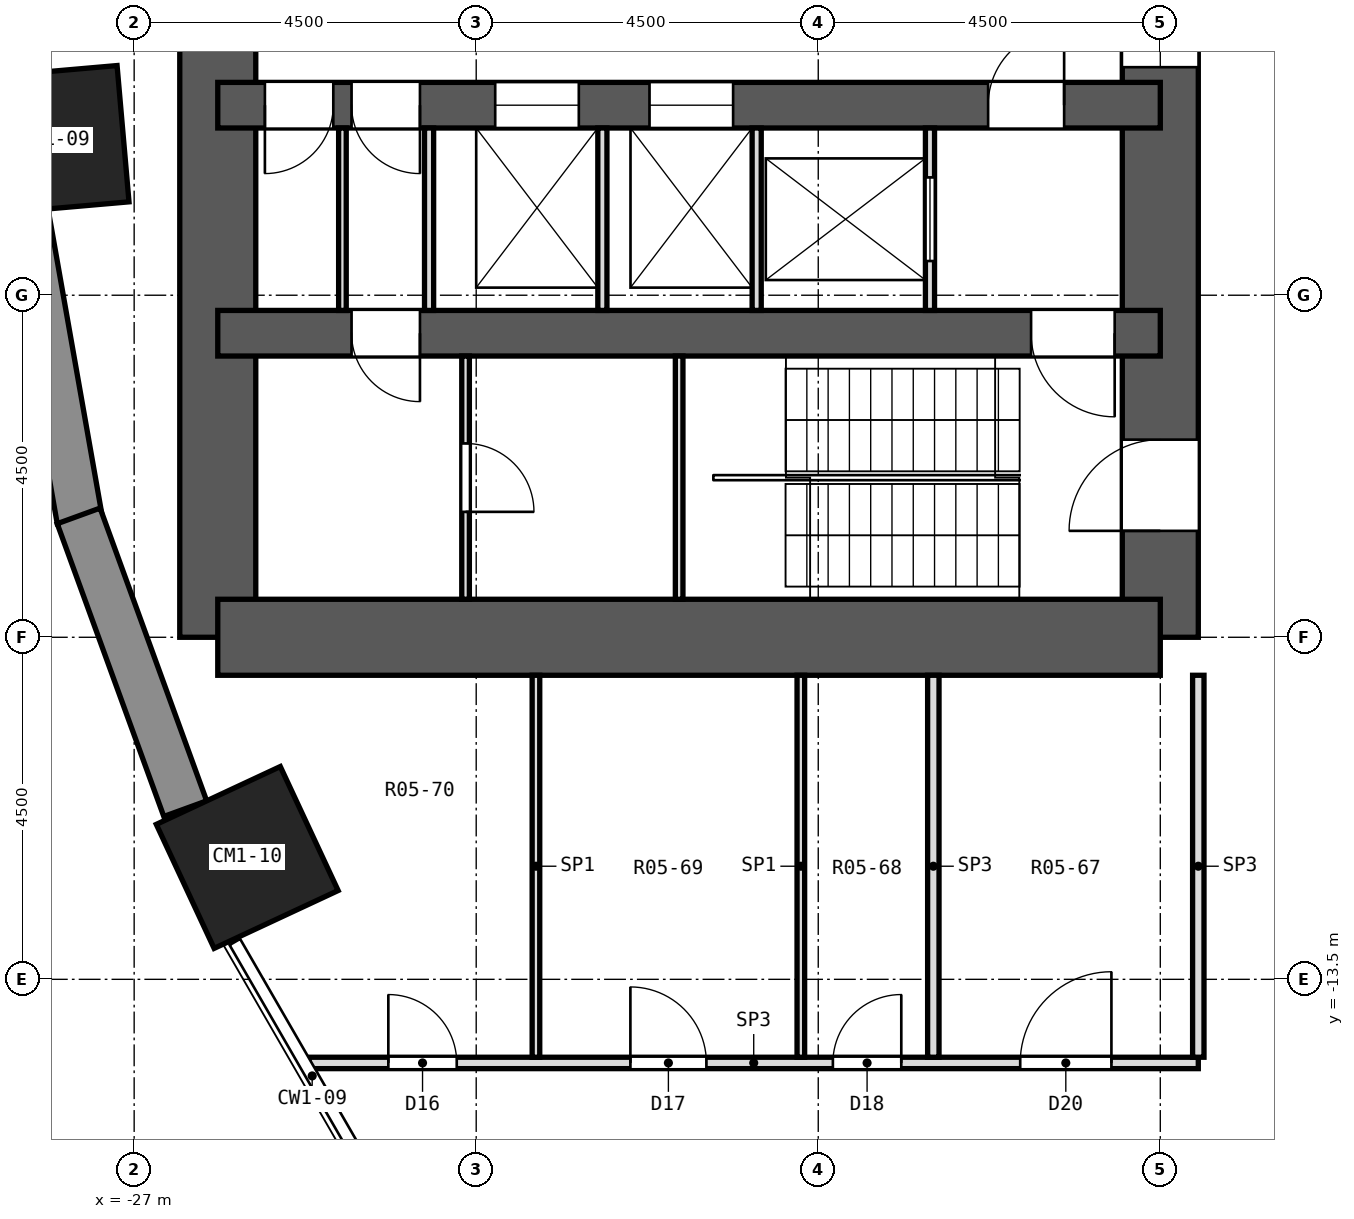
"""IFC4 building model, lengths in metres.
Left out: names, types, materials, properties, quantities, classifications, styles, units other than length and angle.
Written with IfcOpenShell. Run it as: python <this file> out.ifc"""

import sys

from ifc_helpers import new_model, si_unit, direction, frame, frame_2d, origin, origin_2d, place, context, subcontext, project, spatial, rectangle, extrude, element, fill, save


model = new_model("IFC4")
c1 = context("Model", 3, precision=1e-05, world=origin(), true_north=direction((0.0, 1.0)))
c2 = subcontext(c1, "Body", "Model", "MODEL_VIEW")
j1 = project(units=[si_unit("LENGTHUNIT", "METRE"), si_unit("PLANEANGLEUNIT", "RADIAN")], contexts=[c1])
p1 = place(None, origin())
s1 = spatial("IfcSite", under=j1, at=p1, CompositionType="ELEMENT")
p2 = place(p1, origin())
s2 = spatial("IfcBuilding", under=s1, at=p2, CompositionType="ELEMENT")
p3 = place(p2, frame((0.0, 0.0, 9.2)))
s3 = spatial("IfcBuildingStorey", under=s2, at=p3, CompositionType="ELEMENT", Elevation=9.2)
for number, where, z_axis, x_axis in (
    (1, (-28.043, -2.453, 0.0), (0.0, 0.0, 1.0), (-0.996, -0.087, 0.0)),
    (2, (-25.512, -11.897, 0.0), (0.0, 0.0, 1.0), (-0.906, -0.423, 0.0)),
):
    element("IfcColumn", number, at=place(p3, frame(where, z_axis=z_axis, x_axis=x_axis)), inside=s3, PredefinedType="COLUMN", context=c2, shape_type="SweptSolid", body=[
        extrude(rectangle(XDim=1.8, YDim=1.8, at=origin_2d()), origin(), (0.0, 0.0, 1.0), 4.2),
    ])
p4 = place(p3, frame((-13.5, -9.0, 0.0), z_axis=(0.0, 0.0, 1.0), x_axis=(0.0, 1.0, 0.0)))
e3 = element("IfcWall", 3, at=p4, inside=s3, PredefinedType="SHEAR", context=c2, shape_type="SweptSolid", body=[
    extrude(rectangle(XDim=18.0, YDim=1.0, at=frame_2d((9.0, 0.0))), origin(), (0.0, 0.0, 1.0), 4.2),
])
p5 = place(p4, frame((15.4, 0.0, 0.0)))
e4 = element("IfcOpeningElement", 4, at=p5, cuts=e3, PredefinedType="OPENING", context=c2, shape_type="SweptSolid", body=[
    extrude(rectangle(XDim=1.2, YDim=2.1, at=frame_2d((0.6, 1.05))), frame((0.0, 0.512, 0.0), z_axis=(0.0, -1.0, 0.0), x_axis=(1.0, 0.0, 0.0)), (0.0, 0.0, 1.0), 1.024),
])
p6 = place(p4, frame((1.4, 0.0, 0.0)))
e5 = element("IfcOpeningElement", 5, at=p6, cuts=e3, PredefinedType="OPENING", context=c2, shape_type="SweptSolid", body=[
    extrude(rectangle(XDim=1.2, YDim=2.1, at=frame_2d((0.6, 1.05))), frame((0.0, 0.512, 0.0), z_axis=(0.0, -1.0, 0.0), x_axis=(1.0, 0.0, 0.0)), (0.0, 0.0, 1.0), 1.024),
])
p7 = place(p4, frame((7.5, 0.0, 0.0)))
e6 = element("IfcOpeningElement", 6, at=p7, cuts=e3, PredefinedType="OPENING", context=c2, shape_type="SweptSolid", body=[
    extrude(rectangle(XDim=3.0, YDim=2.4, at=frame_2d((1.5, 1.2))), frame((0.0, 0.512, 0.0), z_axis=(0.0, -1.0, 0.0), x_axis=(1.0, 0.0, 0.0)), (0.0, 0.0, 1.0), 1.024),
])
p8 = place(p3, frame((-25.9, -9.0, 0.0), z_axis=(0.0, 0.0, 1.0), x_axis=(0.0, 1.0, 0.0)))
e7 = element("IfcWall", 7, at=p8, inside=s3, PredefinedType="SHEAR", context=c2, shape_type="SweptSolid", body=[
    extrude(rectangle(XDim=18.0, YDim=1.0, at=frame_2d((9.0, 0.0))), origin(), (0.0, 0.0, 1.0), 4.2),
])
p9 = place(p3, frame((-13.5, -9.0, 0.0), z_axis=(0.0, 0.0, 1.0), x_axis=(-1.0, 0.0, 0.0)))
e8 = element("IfcWall", 8, at=p9, inside=s3, PredefinedType="SHEAR", context=c2, shape_type="SweptSolid", body=[
    extrude(rectangle(XDim=12.4, YDim=1.0, at=frame_2d((6.2, 0.0))), origin(), (0.0, 0.0, 1.0), 4.2),
])
p10 = place(p3, frame((-13.5, -5.0, 0.0), z_axis=(0.0, 0.0, 1.0), x_axis=(-1.0, 0.0, 0.0)))
e9 = element("IfcWall", 9, at=p10, inside=s3, PredefinedType="SHEAR", context=c2, shape_type="SweptSolid", body=[
    extrude(rectangle(XDim=12.4, YDim=0.6, at=frame_2d((6.2, 0.0))), origin(), (0.0, 0.0, 1.0), 4.2),
])
p11 = place(p10, frame((9.74, 0.0, 0.0)))
e10 = element("IfcOpeningElement", 10, at=p11, cuts=e9, PredefinedType="OPENING", context=c2, shape_type="SweptSolid", body=[
    extrude(rectangle(XDim=0.9, YDim=2.1, at=frame_2d((0.45, 1.05))), frame((0.0, 0.312, 0.0), z_axis=(0.0, -1.0, 0.0), x_axis=(1.0, 0.0, 0.0)), (0.0, 0.0, 1.0), 0.624),
])
p12 = place(p10, frame((0.6, 0.0, 0.0)))
e11 = element("IfcOpeningElement", 11, at=p12, cuts=e9, PredefinedType="OPENING", context=c2, shape_type="SweptSolid", body=[
    extrude(rectangle(XDim=1.1, YDim=2.1, at=frame_2d((0.55, 1.05))), frame((0.0, 0.312, 0.0), z_axis=(0.0, -1.0, 0.0), x_axis=(1.0, 0.0, 0.0)), (0.0, 0.0, 1.0), 0.624),
])
p13 = place(p3, frame((-13.5, -2.0, 0.0), z_axis=(0.0, 0.0, 1.0), x_axis=(-1.0, 0.0, 0.0)))
e12 = element("IfcWall", 12, at=p13, inside=s3, PredefinedType="SHEAR", context=c2, shape_type="SweptSolid", body=[
    extrude(rectangle(XDim=12.4, YDim=0.6, at=frame_2d((6.2, 0.0))), origin(), (0.0, 0.0, 1.0), 4.2),
])
p14 = place(p13, frame((5.62, 0.0, 0.0)))
e13 = element("IfcOpeningElement", 13, at=p14, cuts=e12, PredefinedType="OPENING", context=c2, shape_type="SweptSolid", body=[
    extrude(rectangle(XDim=1.1, YDim=2.1, at=frame_2d((0.55, 1.05))), frame((0.0, 0.312, 0.0), z_axis=(0.0, -1.0, 0.0), x_axis=(1.0, 0.0, 0.0)), (0.0, 0.0, 1.0), 0.624),
])
p15 = place(p13, frame((7.65, 0.0, 0.0)))
e14 = element("IfcOpeningElement", 14, at=p15, cuts=e12, PredefinedType="OPENING", context=c2, shape_type="SweptSolid", body=[
    extrude(rectangle(XDim=1.1, YDim=2.1, at=frame_2d((0.55, 1.05))), frame((0.0, 0.312, 0.0), z_axis=(0.0, -1.0, 0.0), x_axis=(1.0, 0.0, 0.0)), (0.0, 0.0, 1.0), 0.624),
])
p16 = place(p13, frame((1.265, 0.0, 0.0)))
e15 = element("IfcOpeningElement", 15, at=p16, cuts=e12, PredefinedType="OPENING", context=c2, shape_type="SweptSolid", body=[
    extrude(rectangle(XDim=1.0, YDim=2.1, at=frame_2d((0.5, 1.05))), frame((0.0, 0.312, 0.0), z_axis=(0.0, -1.0, 0.0), x_axis=(1.0, 0.0, 0.0)), (0.0, 0.0, 1.0), 0.624),
])
p17 = place(p13, frame((9.74, 0.0, 0.0)))
e16 = element("IfcOpeningElement", 16, at=p17, cuts=e12, PredefinedType="OPENING", context=c2, shape_type="SweptSolid", body=[
    extrude(rectangle(XDim=0.9, YDim=2.1, at=frame_2d((0.45, 1.05))), frame((0.0, 0.312, 0.0), z_axis=(0.0, -1.0, 0.0), x_axis=(1.0, 0.0, 0.0)), (0.0, 0.0, 1.0), 0.624),
])
p18 = place(p13, frame((10.88, 0.0, 0.0)))
e17 = element("IfcOpeningElement", 17, at=p18, cuts=e12, PredefinedType="OPENING", context=c2, shape_type="SweptSolid", body=[
    extrude(rectangle(XDim=0.9, YDim=2.1, at=frame_2d((0.45, 1.05))), frame((0.0, 0.312, 0.0), z_axis=(0.0, -1.0, 0.0), x_axis=(1.0, 0.0, 0.0)), (0.0, 0.0, 1.0), 0.624),
])
p19 = place(p3, frame((-28.428, -3.417, 0.0), z_axis=(0.0, 0.0, 1.0), x_axis=(0.173673210505, -0.984803338719, 0.0)))
e18 = element("IfcWall", 18, at=p19, inside=s3, PredefinedType="SOLIDWALL", context=c2, shape_type="SweptSolid", body=[
    extrude(rectangle(XDim=4.099, YDim=0.6, at=frame_2d((2.05, 0.0))), origin(), (0.0, 0.0, 1.0), 3.65),
])
p20 = place(p3, frame((-27.73, -7.403, 0.0), z_axis=(0.0, 0.0, 1.0), x_axis=(0.342034744565, -0.939687306241, 0.0)))
e19 = element("IfcWall", 19, at=p20, inside=s3, PredefinedType="SOLIDWALL", context=c2, shape_type="SweptSolid", body=[
    extrude(rectangle(XDim=4.099, YDim=0.6, at=frame_2d((2.05, 0.0))), origin(), (0.0, 0.0, 1.0), 3.65),
])
p21 = place(p3, frame((-24.698, -14.6, 0.0), z_axis=(0.0, 0.0, 1.0), x_axis=(1.0, 0.0, 0.0)))
e20 = element("IfcWall", 20, at=p21, inside=s3, PredefinedType="PARTITIONING", context=c2, shape_type="SweptSolid", body=[
    extrude(rectangle(XDim=11.698, YDim=0.15, at=frame_2d((5.849, 0.0))), origin(), (0.0, 0.0, 1.0), 3.65),
])
p22 = place(p21, frame((1.042, 0.0, 0.0)))
e21 = element("IfcOpeningElement", 21, at=p22, cuts=e20, PredefinedType="OPENING", context=c2, shape_type="SweptSolid", body=[
    extrude(rectangle(XDim=0.9, YDim=2.1, at=frame_2d((0.45, 1.05))), frame((0.0, 0.087, 0.0), z_axis=(0.0, -1.0, 0.0), x_axis=(1.0, 0.0, 0.0)), (0.0, 0.0, 1.0), 0.174),
])
p23 = place(p21, frame((4.227, 0.0, 0.0)))
e22 = element("IfcOpeningElement", 22, at=p23, cuts=e20, PredefinedType="OPENING", context=c2, shape_type="SweptSolid", body=[
    extrude(rectangle(XDim=1.0, YDim=2.1, at=frame_2d((0.5, 1.05))), frame((0.0, 0.087, 0.0), z_axis=(0.0, -1.0, 0.0), x_axis=(1.0, 0.0, 0.0)), (0.0, 0.0, 1.0), 0.174),
])
p24 = place(p21, frame((6.89, 0.0, 0.0)))
e23 = element("IfcOpeningElement", 23, at=p24, cuts=e20, PredefinedType="OPENING", context=c2, shape_type="SweptSolid", body=[
    extrude(rectangle(XDim=0.9, YDim=2.1, at=frame_2d((0.45, 1.05))), frame((0.0, 0.087, 0.0), z_axis=(0.0, -1.0, 0.0), x_axis=(1.0, 0.0, 0.0)), (0.0, 0.0, 1.0), 0.174),
])
p25 = place(p21, frame((9.355, 0.0, 0.0)))
e24 = element("IfcOpeningElement", 24, at=p25, cuts=e20, PredefinedType="OPENING", context=c2, shape_type="SweptSolid", body=[
    extrude(rectangle(XDim=1.2, YDim=2.1, at=frame_2d((0.6, 1.05))), frame((0.0, 0.087, 0.0), z_axis=(0.0, -1.0, 0.0), x_axis=(1.0, 0.0, 0.0)), (0.0, 0.0, 1.0), 0.174),
])
for number, where, z_axis, x_axis in (
    (25, (-13.0, -14.525, 0.0), (0.0, 0.0, 1.0), (0.0, 1.0, 0.0)),
    (26, (-16.486, -14.525, 0.0), (0.0, 0.0, 1.0), (0.0, 1.0, 0.0)),
):
    element("IfcWall", number, at=place(p3, frame(where, z_axis=z_axis, x_axis=x_axis)), inside=s3, PredefinedType="PARTITIONING", context=c2, shape_type="SweptSolid", body=[
        extrude(rectangle(XDim=5.025, YDim=0.15, at=frame_2d((2.512, 0.0))), origin(), (0.0, 0.0, 1.0), 3.65),
    ])
for number, where, z_axis, x_axis in (
    (27, (-18.229, -14.525, 0.0), (0.0, 0.0, 1.0), (0.0, 1.0, 0.0)),
    (28, (-21.714, -14.525, 0.0), (0.0, 0.0, 1.0), (0.0, 1.0, 0.0)),
):
    element("IfcWall", number, at=place(p3, frame(where, z_axis=z_axis, x_axis=x_axis)), inside=s3, PredefinedType="PARTITIONING", context=c2, shape_type="SweptSolid", body=[
        extrude(rectangle(XDim=5.025, YDim=0.1, at=frame_2d((2.512, 0.0))), origin(), (0.0, 0.0, 1.0), 3.65),
    ])
p26 = place(p3, frame((-16.53, -4.7, 0.0), z_axis=(0.0, 0.0, 1.0), x_axis=(0.0, 1.0, 0.0)))
e29 = element("IfcWall", 29, at=p26, inside=s3, PredefinedType="PARTITIONING", context=c2, shape_type="SweptSolid", body=[
    extrude(rectangle(XDim=2.4, YDim=0.12, at=frame_2d((1.2, 0.0))), origin(), (0.0, 0.0, 1.0), 3.65),
])
p27 = place(p26, frame((0.65, 0.0, 0.0)))
e30 = element("IfcOpeningElement", 30, at=p27, cuts=e29, PredefinedType="OPENING", context=c2, shape_type="SweptSolid", body=[
    extrude(rectangle(XDim=1.1, YDim=2.1, at=frame_2d((0.55, 1.05))), frame((0.0, 0.072, 0.0), z_axis=(0.0, -1.0, 0.0), x_axis=(1.0, 0.0, 0.0)), (0.0, 0.0, 1.0), 0.144),
])
for number, where, z_axis, x_axis in (
    (31, (-18.81, -4.7, 0.0), (0.0, 0.0, 1.0), (0.0, 1.0, 0.0)),
    (32, (-20.84, -4.7, 0.0), (0.0, 0.0, 1.0), (0.0, 1.0, 0.0)),
    (33, (-23.12, -4.7, 0.0), (0.0, 0.0, 1.0), (0.0, 1.0, 0.0)),
):
    element("IfcWall", number, at=place(p3, frame(where, z_axis=z_axis, x_axis=x_axis)), inside=s3, PredefinedType="PARTITIONING", context=c2, shape_type="SweptSolid", body=[
        extrude(rectangle(XDim=2.4, YDim=0.12, at=frame_2d((1.2, 0.0))), origin(), (0.0, 0.0, 1.0), 3.65),
    ])
p28 = place(p3, frame((-24.26, -4.7, 0.0), z_axis=(0.0, 0.0, 1.0), x_axis=(0.0, 1.0, 0.0)))
e34 = element("IfcWall", 34, at=p28, inside=s3, PredefinedType="PARTITIONING", context=c2, shape_type="SweptSolid", body=[
    extrude(rectangle(XDim=2.4, YDim=0.1, at=frame_2d((1.2, 0.0))), origin(), (0.0, 0.0, 1.0), 3.65),
])
p29 = place(p3, frame((-19.83, -8.5, 0.0), z_axis=(0.0, 0.0, 1.0), x_axis=(0.0, 1.0, 0.0)))
e35 = element("IfcWall", 35, at=p29, inside=s3, PredefinedType="PARTITIONING", context=c2, shape_type="SweptSolid", body=[
    extrude(rectangle(XDim=3.2, YDim=0.1, at=frame_2d((1.6, 0.0))), origin(), (0.0, 0.0, 1.0), 3.65),
])
p30 = place(p3, frame((-22.64, -8.5, 0.0), z_axis=(0.0, 0.0, 1.0), x_axis=(0.0, 1.0, 0.0)))
e36 = element("IfcWall", 36, at=p30, inside=s3, PredefinedType="PARTITIONING", context=c2, shape_type="SweptSolid", body=[
    extrude(rectangle(XDim=3.2, YDim=0.1, at=frame_2d((1.6, 0.0))), origin(), (0.0, 0.0, 1.0), 3.65),
])
p31 = place(p30, frame((1.15, 0.0, 0.0)))
e37 = element("IfcOpeningElement", 37, at=p31, cuts=e36, PredefinedType="OPENING", context=c2, shape_type="SweptSolid", body=[
    extrude(rectangle(XDim=0.9, YDim=2.1, at=frame_2d((0.45, 1.05))), frame((0.0, 0.062, 0.0), z_axis=(0.0, -1.0, 0.0), x_axis=(1.0, 0.0, 0.0)), (0.0, 0.0, 1.0), 0.124),
])
p32 = place(p22, origin())
e38 = element("IfcDoor", 38, at=p32, inside=s3, OperationType="SINGLE_SWING_LEFT", PredefinedType="DOOR", context=c2, shape_type="SweptSolid", body=[
    extrude(rectangle(XDim=0.9, YDim=2.1, at=frame_2d((0.45, 1.05))), frame((0.0, 0.025, 0.0), z_axis=(0.0, -1.0, 0.0), x_axis=(1.0, 0.0, 0.0)), (0.0, 0.0, 1.0), 0.05),
])
fill(e21, e38)
p33 = place(p23, origin())
e39 = element("IfcDoor", 39, at=p33, inside=s3, OperationType="SINGLE_SWING_LEFT", PredefinedType="DOOR", context=c2, shape_type="SweptSolid", body=[
    extrude(rectangle(XDim=1.0, YDim=2.1, at=frame_2d((0.5, 1.05))), frame((0.0, 0.025, 0.0), z_axis=(0.0, -1.0, 0.0), x_axis=(1.0, 0.0, 0.0)), (0.0, 0.0, 1.0), 0.05),
])
fill(e22, e39)
p34 = place(p24, origin())
e40 = element("IfcDoor", 40, at=p34, inside=s3, OperationType="SINGLE_SWING_RIGHT", PredefinedType="DOOR", context=c2, shape_type="SweptSolid", body=[
    extrude(rectangle(XDim=0.9, YDim=2.1, at=frame_2d((0.45, 1.05))), frame((0.0, 0.025, 0.0), z_axis=(0.0, -1.0, 0.0), x_axis=(1.0, 0.0, 0.0)), (0.0, 0.0, 1.0), 0.05),
])
fill(e23, e40)
p35 = place(p25, origin())
e41 = element("IfcDoor", 41, at=p35, inside=s3, OperationType="SINGLE_SWING_RIGHT", PredefinedType="DOOR", context=c2, shape_type="SweptSolid", body=[
    extrude(rectangle(XDim=1.2, YDim=2.1, at=frame_2d((0.6, 1.05))), frame((0.0, 0.025, 0.0), z_axis=(0.0, -1.0, 0.0), x_axis=(1.0, 0.0, 0.0)), (0.0, 0.0, 1.0), 0.05),
])
fill(e24, e41)
p36 = place(p27, origin())
e42 = element("IfcDoor", 42, at=p36, inside=s3, OperationType="DOUBLE_DOOR_SLIDING", PredefinedType="DOOR", context=c2, shape_type="SweptSolid", body=[
    extrude(rectangle(XDim=1.1, YDim=2.1, at=frame_2d((0.55, 1.05))), frame((0.0, 0.025, 0.0), z_axis=(0.0, -1.0, 0.0), x_axis=(1.0, 0.0, 0.0)), (0.0, 0.0, 1.0), 0.05),
])
fill(e30, e42)
p37 = place(p14, origin())
e43 = element("IfcDoor", 43, at=p37, inside=s3, OperationType="DOUBLE_DOOR_SLIDING", PredefinedType="DOOR", context=c2, shape_type="SweptSolid", body=[
    extrude(rectangle(XDim=1.1, YDim=2.1, at=frame_2d((0.55, 1.05))), frame((0.0, 0.025, 0.0), z_axis=(0.0, -1.0, 0.0), x_axis=(1.0, 0.0, 0.0)), (0.0, 0.0, 1.0), 0.05),
])
fill(e13, e43)
p38 = place(p15, origin())
e44 = element("IfcDoor", 44, at=p38, inside=s3, OperationType="DOUBLE_DOOR_SLIDING", PredefinedType="DOOR", context=c2, shape_type="SweptSolid", body=[
    extrude(rectangle(XDim=1.1, YDim=2.1, at=frame_2d((0.55, 1.05))), frame((0.0, 0.025, 0.0), z_axis=(0.0, -1.0, 0.0), x_axis=(1.0, 0.0, 0.0)), (0.0, 0.0, 1.0), 0.05),
])
fill(e14, e44)
p39 = place(p16, frame((1.0, 0.0, 0.0), z_axis=(0.0, 0.0, 1.0), x_axis=(-1.0, 0.0, 0.0)))
e45 = element("IfcDoor", 45, at=p39, inside=s3, OperationType="SINGLE_SWING_RIGHT", PredefinedType="DOOR", context=c2, shape_type="SweptSolid", body=[
    extrude(rectangle(XDim=1.0, YDim=2.1, at=frame_2d((0.5, 1.05))), frame((0.0, 0.025, 0.0), z_axis=(0.0, -1.0, 0.0), x_axis=(1.0, 0.0, 0.0)), (0.0, 0.0, 1.0), 0.05),
])
fill(e15, e45)
p40 = place(p17, origin())
e46 = element("IfcDoor", 46, at=p40, inside=s3, OperationType="SINGLE_SWING_LEFT", PredefinedType="DOOR", context=c2, shape_type="SweptSolid", body=[
    extrude(rectangle(XDim=0.9, YDim=2.1, at=frame_2d((0.45, 1.05))), frame((0.0, 0.025, 0.0), z_axis=(0.0, -1.0, 0.0), x_axis=(1.0, 0.0, 0.0)), (0.0, 0.0, 1.0), 0.05),
])
fill(e16, e46)
p41 = place(p18, origin())
e47 = element("IfcDoor", 47, at=p41, inside=s3, OperationType="SINGLE_SWING_RIGHT", PredefinedType="DOOR", context=c2, shape_type="SweptSolid", body=[
    extrude(rectangle(XDim=0.9, YDim=2.1, at=frame_2d((0.45, 1.05))), frame((0.0, 0.025, 0.0), z_axis=(0.0, -1.0, 0.0), x_axis=(1.0, 0.0, 0.0)), (0.0, 0.0, 1.0), 0.05),
])
fill(e17, e47)
p42 = place(p31, frame((0.9, 0.0, 0.0), z_axis=(0.0, 0.0, 1.0), x_axis=(-1.0, 0.0, 0.0)))
e48 = element("IfcDoor", 48, at=p42, inside=s3, OperationType="SINGLE_SWING_RIGHT", PredefinedType="DOOR", context=c2, shape_type="SweptSolid", body=[
    extrude(rectangle(XDim=0.9, YDim=2.1, at=frame_2d((0.45, 1.05))), frame((0.0, 0.025, 0.0), z_axis=(0.0, -1.0, 0.0), x_axis=(1.0, 0.0, 0.0)), (0.0, 0.0, 1.0), 0.05),
])
fill(e37, e48)
p43 = place(p11, origin())
e49 = element("IfcDoor", 49, at=p43, inside=s3, OperationType="SINGLE_SWING_LEFT", PredefinedType="DOOR", context=c2, shape_type="SweptSolid", body=[
    extrude(rectangle(XDim=0.9, YDim=2.1, at=frame_2d((0.45, 1.05))), frame((0.0, 0.025, 0.0), z_axis=(0.0, -1.0, 0.0), x_axis=(1.0, 0.0, 0.0)), (0.0, 0.0, 1.0), 0.05),
])
fill(e10, e49)
p44 = place(p12, origin())
e50 = element("IfcDoor", 50, at=p44, inside=s3, OperationType="SINGLE_SWING_LEFT", PredefinedType="DOOR", context=c2, shape_type="SweptSolid", body=[
    extrude(rectangle(XDim=1.1, YDim=2.1, at=frame_2d((0.55, 1.05))), frame((0.0, 0.025, 0.0), z_axis=(0.0, -1.0, 0.0), x_axis=(1.0, 0.0, 0.0)), (0.0, 0.0, 1.0), 0.05),
])
fill(e11, e50)
p45 = place(p6, origin())
e51 = element("IfcDoor", 51, at=p45, inside=s3, OperationType="SINGLE_SWING_LEFT", PredefinedType="DOOR", context=c2, shape_type="SweptSolid", body=[
    extrude(rectangle(XDim=1.2, YDim=2.1, at=frame_2d((0.6, 1.05))), frame((0.0, 0.025, 0.0), z_axis=(0.0, -1.0, 0.0), x_axis=(1.0, 0.0, 0.0)), (0.0, 0.0, 1.0), 0.05),
])
fill(e5, e51)
p46 = place(p7, origin())
e52 = element("IfcDoor", 52, at=p46, inside=s3, OperationType="DOUBLE_DOOR_SLIDING", PredefinedType="DOOR", context=c2, shape_type="SweptSolid", body=[
    extrude(rectangle(XDim=3.0, YDim=2.4, at=frame_2d((1.5, 1.2))), frame((0.0, 0.025, 0.0), z_axis=(0.0, -1.0, 0.0), x_axis=(1.0, 0.0, 0.0)), (0.0, 0.0, 1.0), 0.05),
])
fill(e6, e52)
save(model, sys.argv[1])
